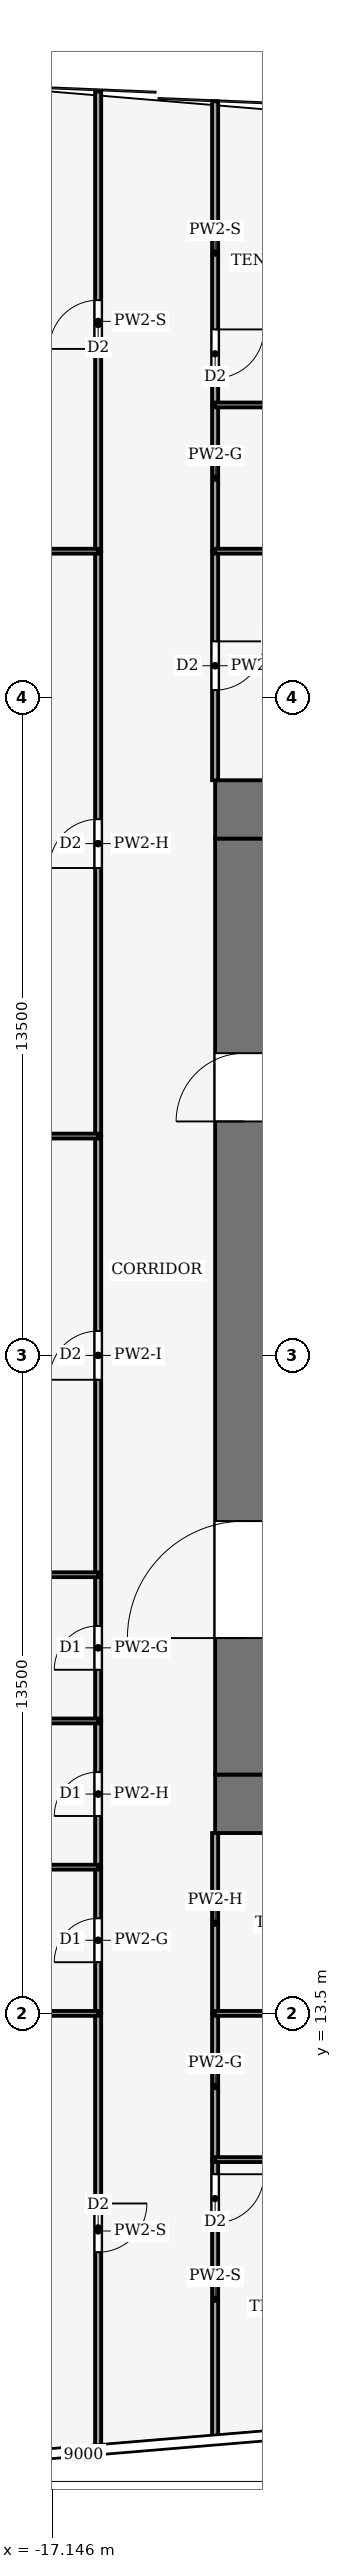
"""IFC4 building model, lengths in metres.
Left out: names, types, materials, properties, quantities, classifications, styles, units other than length and angle.
Written with IfcOpenShell. Run it as: python <this file> out.ifc"""

import sys

from ifc_helpers import new_model, si_unit, direction, frame, frame_2d, origin, place, context, subcontext, project, spatial, rectangle, extrude, element, fill, save


model = new_model("IFC4")
c1 = context("Model", 3, precision=1e-05, world=origin(), true_north=direction((0.0, 1.0)))
c2 = subcontext(c1, "Body", "Model", "MODEL_VIEW")
j1 = project(units=[si_unit("LENGTHUNIT", "METRE"), si_unit("PLANEANGLEUNIT", "RADIAN")], contexts=[c1])
p1 = place(None, origin())
s1 = spatial("IfcSite", under=j1, at=p1, CompositionType="ELEMENT")
p2 = place(p1, origin())
s2 = spatial("IfcBuilding", under=s1, at=p2, CompositionType="ELEMENT")
p3 = place(p2, frame((0.0, 0.0, 102.0)))
s3 = spatial("IfcBuildingStorey", under=s2, at=p3, CompositionType="ELEMENT", Elevation=102.0)
for number, where, z_axis, x_axis in (
    (1, (-13.8, 17.8, -0.13), (0.0, 0.0, 1.0), (1.0, 0.0, 0.0)),
    (2, (-13.8, 38.2, -0.13), (0.0, 0.0, 1.0), (1.0, 0.0, 0.0)),
):
    element("IfcWall", number, at=place(p3, frame(where, z_axis=z_axis, x_axis=x_axis)), inside=s3, PredefinedType="SHEAR", context=c2, shape_type="SweptSolid", body=[
        extrude(rectangle(XDim=27.6, YDim=1.2, at=frame_2d((13.8, 0.0))), origin(), (0.0, 0.0, 1.0), 4.0),
    ])
p4 = place(p3, frame((-13.2, 18.4, -0.13), z_axis=(0.0, 0.0, 1.0), x_axis=(0.0, 1.0, 0.0)))
e3 = element("IfcWall", 3, at=p4, inside=s3, PredefinedType="SHEAR", context=c2, shape_type="SweptSolid", body=[
    extrude(rectangle(XDim=19.2, YDim=1.2, at=frame_2d((9.6, 0.0))), origin(), (0.0, 0.0, 1.0), 4.0),
])
p5 = place(p4, frame((2.8, 0.0, 0.13)))
e4 = element("IfcOpeningElement", 4, at=p5, cuts=e3, PredefinedType="OPENING", context=c2, shape_type="SweptSolid", body=[
    extrude(rectangle(XDim=2.4, YDim=2.4, at=frame_2d((1.2, 1.2))), frame((0.0, 0.61, 0.0), z_axis=(0.0, -1.0, 0.0), x_axis=(1.0, 0.0, 0.0)), (0.0, 0.0, 1.0), 1.22),
])
p6 = place(p4, frame((13.4, 0.0, 0.13)))
e5 = element("IfcOpeningElement", 5, at=p6, cuts=e3, PredefinedType="OPENING", context=c2, shape_type="SweptSolid", body=[
    extrude(rectangle(XDim=1.4, YDim=2.2, at=frame_2d((0.7, 1.1))), frame((0.0, 0.61, 0.0), z_axis=(0.0, -1.0, 0.0), x_axis=(1.0, 0.0, 0.0)), (0.0, 0.0, 1.0), 1.22),
])
p7 = place(p3, frame((-16.2, 13.5, 0.0), z_axis=(0.0, 0.0, 1.0), x_axis=(0.0, -1.0, 0.0)))
e6 = element("IfcWall", 6, at=p7, inside=s3, PredefinedType="PARTITIONING", context=c2, shape_type="SweptSolid", body=[
    extrude(rectangle(XDim=8.93, YDim=0.125, at=frame_2d((4.465, 0.0))), origin(), (0.0, 0.0, 1.0), 3.04),
])
p8 = place(p7, frame((3.9, 0.0, 0.0)))
e7 = element("IfcOpeningElement", 7, at=p8, cuts=e6, PredefinedType="OPENING", context=c2, shape_type="SweptSolid", body=[
    extrude(rectangle(XDim=1.0, YDim=2.1, at=frame_2d((0.5, 1.05))), frame((0.0, 0.073, 0.0), z_axis=(0.0, -1.0, 0.0), x_axis=(1.0, 0.0, 0.0)), (0.0, 0.0, 1.0), 0.145),
])
p9 = place(p3, frame((-16.2, 13.5, 0.0), z_axis=(0.0, 0.0, 1.0), x_axis=(0.0, 1.0, 0.0)))
e8 = element("IfcWall", 8, at=p9, inside=s3, PredefinedType="PARTITIONING", context=c2, shape_type="SweptSolid", body=[
    extrude(rectangle(XDim=3.0, YDim=0.125, at=frame_2d((1.5, 0.0))), origin(), (0.0, 0.0, 1.0), 3.87),
])
p10 = place(p9, frame((1.05, 0.0, 0.0)))
e9 = element("IfcOpeningElement", 9, at=p10, cuts=e8, PredefinedType="OPENING", context=c2, shape_type="SweptSolid", body=[
    extrude(rectangle(XDim=0.9, YDim=2.1, at=frame_2d((0.45, 1.05))), frame((0.0, 0.073, 0.0), z_axis=(0.0, -1.0, 0.0), x_axis=(1.0, 0.0, 0.0)), (0.0, 0.0, 1.0), 0.145),
])
p11 = place(p3, frame((-16.2, 16.5, 0.0), z_axis=(0.0, 0.0, 1.0), x_axis=(0.0, 1.0, 0.0)))
e10 = element("IfcWall", 10, at=p11, inside=s3, PredefinedType="PARTITIONING", context=c2, shape_type="SweptSolid", body=[
    extrude(rectangle(XDim=3.0, YDim=0.125, at=frame_2d((1.5, 0.0))), origin(), (0.0, 0.0, 1.0), 3.14),
])
p12 = place(p11, frame((1.05, 0.0, 0.0)))
e11 = element("IfcOpeningElement", 11, at=p12, cuts=e10, PredefinedType="OPENING", context=c2, shape_type="SweptSolid", body=[
    extrude(rectangle(XDim=0.9, YDim=2.1, at=frame_2d((0.45, 1.05))), frame((0.0, 0.073, 0.0), z_axis=(0.0, -1.0, 0.0), x_axis=(1.0, 0.0, 0.0)), (0.0, 0.0, 1.0), 0.145),
])
p13 = place(p3, frame((-16.2, 19.5, 0.0), z_axis=(0.0, 0.0, 1.0), x_axis=(0.0, 1.0, 0.0)))
e12 = element("IfcWall", 12, at=p13, inside=s3, PredefinedType="PARTITIONING", context=c2, shape_type="SweptSolid", body=[
    extrude(rectangle(XDim=3.0, YDim=0.125, at=frame_2d((1.5, 0.0))), origin(), (0.0, 0.0, 1.0), 3.87),
])
p14 = place(p13, frame((1.05, 0.0, 0.0)))
e13 = element("IfcOpeningElement", 13, at=p14, cuts=e12, PredefinedType="OPENING", context=c2, shape_type="SweptSolid", body=[
    extrude(rectangle(XDim=0.9, YDim=2.1, at=frame_2d((0.45, 1.05))), frame((0.0, 0.073, 0.0), z_axis=(0.0, -1.0, 0.0), x_axis=(1.0, 0.0, 0.0)), (0.0, 0.0, 1.0), 0.145),
])
p15 = place(p3, frame((-16.2, 22.5, 0.0), z_axis=(0.0, 0.0, 1.0), x_axis=(0.0, 1.0, 0.0)))
e14 = element("IfcWall", 14, at=p15, inside=s3, PredefinedType="PARTITIONING", context=c2, shape_type="SweptSolid", body=[
    extrude(rectangle(XDim=9.0, YDim=0.125, at=frame_2d((4.5, 0.0))), origin(), (0.0, 0.0, 1.0), 3.48),
])
p16 = place(p15, frame((4.0, 0.0, 0.0)))
e15 = element("IfcOpeningElement", 15, at=p16, cuts=e14, PredefinedType="OPENING", context=c2, shape_type="SweptSolid", body=[
    extrude(rectangle(XDim=1.0, YDim=2.1, at=frame_2d((0.5, 1.05))), frame((0.0, 0.073, 0.0), z_axis=(0.0, -1.0, 0.0), x_axis=(1.0, 0.0, 0.0)), (0.0, 0.0, 1.0), 0.145),
])
p17 = place(p3, frame((-16.2, 31.5, 0.0), z_axis=(0.0, 0.0, 1.0), x_axis=(0.0, 1.0, 0.0)))
e16 = element("IfcWall", 16, at=p17, inside=s3, PredefinedType="PARTITIONING", context=c2, shape_type="SweptSolid", body=[
    extrude(rectangle(XDim=12.0, YDim=0.125, at=frame_2d((6.0, 0.0))), origin(), (0.0, 0.0, 1.0), 3.14),
])
p18 = place(p17, frame((5.5, 0.0, 0.0)))
e17 = element("IfcOpeningElement", 17, at=p18, cuts=e16, PredefinedType="OPENING", context=c2, shape_type="SweptSolid", body=[
    extrude(rectangle(XDim=1.0, YDim=2.1, at=frame_2d((0.5, 1.05))), frame((0.0, 0.073, 0.0), z_axis=(0.0, -1.0, 0.0), x_axis=(1.0, 0.0, 0.0)), (0.0, 0.0, 1.0), 0.145),
])
p19 = place(p3, frame((-16.2, 43.5, 0.0), z_axis=(0.0, 0.0, 1.0), x_axis=(0.0, 1.0, 0.0)))
e18 = element("IfcWall", 18, at=p19, inside=s3, PredefinedType="PARTITIONING", context=c2, shape_type="SweptSolid", body=[
    extrude(rectangle(XDim=9.43, YDim=0.125, at=frame_2d((4.715, 0.0))), origin(), (0.0, 0.0, 1.0), 3.04),
])
p20 = place(p19, frame((4.15, 0.0, 0.0)))
e19 = element("IfcOpeningElement", 19, at=p20, cuts=e18, PredefinedType="OPENING", context=c2, shape_type="SweptSolid", body=[
    extrude(rectangle(XDim=1.0, YDim=2.1, at=frame_2d((0.5, 1.05))), frame((0.0, 0.073, 0.0), z_axis=(0.0, -1.0, 0.0), x_axis=(1.0, 0.0, 0.0)), (0.0, 0.0, 1.0), 0.145),
])
p21 = place(p3, frame((-13.8, 10.5, 0.0), z_axis=(0.0, 0.0, 1.0), x_axis=(0.0, -1.0, 0.0)))
e20 = element("IfcWall", 20, at=p21, inside=s3, PredefinedType="PARTITIONING", context=c2, shape_type="SweptSolid", body=[
    extrude(rectangle(XDim=5.73, YDim=0.125, at=frame_2d((2.865, 0.0))), origin(), (0.0, 0.0, 1.0), 3.04),
])
p22 = place(p21, frame((0.3, 0.0, 0.0)))
e21 = element("IfcOpeningElement", 21, at=p22, cuts=e20, PredefinedType="OPENING", context=c2, shape_type="SweptSolid", body=[
    extrude(rectangle(XDim=1.0, YDim=2.1, at=frame_2d((0.5, 1.05))), frame((0.0, 0.073, 0.0), z_axis=(0.0, -1.0, 0.0), x_axis=(1.0, 0.0, 0.0)), (0.0, 0.0, 1.0), 0.145),
])
p23 = place(p3, frame((-13.8, 10.5, 0.0), z_axis=(0.0, 0.0, 1.0), x_axis=(0.0, 1.0, 0.0)))
e22 = element("IfcWall", 22, at=p23, inside=s3, PredefinedType="PARTITIONING", context=c2, shape_type="SweptSolid", body=[
    extrude(rectangle(XDim=3.0, YDim=0.125, at=frame_2d((1.5, 0.0))), origin(), (0.0, 0.0, 1.0), 3.87),
])
p24 = place(p3, frame((-13.8, 13.5, 0.0), z_axis=(0.0, 0.0, 1.0), x_axis=(0.0, 1.0, 0.0)))
e23 = element("IfcWall", 23, at=p24, inside=s3, PredefinedType="PARTITIONING", context=c2, shape_type="SweptSolid", body=[
    extrude(rectangle(XDim=3.7, YDim=0.125, at=frame_2d((1.85, 0.0))), origin(), (0.0, 0.0, 1.0), 3.14),
])
p25 = place(p3, frame((-13.8, 43.5, 0.0), z_axis=(0.0, 0.0, 1.0), x_axis=(0.0, -1.0, 0.0)))
e24 = element("IfcWall", 24, at=p25, inside=s3, PredefinedType="PARTITIONING", context=c2, shape_type="SweptSolid", body=[
    extrude(rectangle(XDim=4.7, YDim=0.125, at=frame_2d((2.35, 0.0))), origin(), (0.0, 0.0, 1.0), 3.14),
])
p26 = place(p25, frame((1.85, 0.0, 0.0)))
e25 = element("IfcOpeningElement", 25, at=p26, cuts=e24, PredefinedType="OPENING", context=c2, shape_type="SweptSolid", body=[
    extrude(rectangle(XDim=1.0, YDim=2.1, at=frame_2d((0.5, 1.05))), frame((0.0, 0.073, 0.0), z_axis=(0.0, -1.0, 0.0), x_axis=(1.0, 0.0, 0.0)), (0.0, 0.0, 1.0), 0.145),
])
p27 = place(p3, frame((-13.8, 43.5, 0.0), z_axis=(0.0, 0.0, 1.0), x_axis=(0.0, 1.0, 0.0)))
e26 = element("IfcWall", 26, at=p27, inside=s3, PredefinedType="PARTITIONING", context=c2, shape_type="SweptSolid", body=[
    extrude(rectangle(XDim=3.0, YDim=0.125, at=frame_2d((1.5, 0.0))), origin(), (0.0, 0.0, 1.0), 3.87),
])
p28 = place(p3, frame((-13.8, 52.73, 0.0), z_axis=(0.0, 0.0, 1.0), x_axis=(0.0, -1.0, 0.0)))
e27 = element("IfcWall", 27, at=p28, inside=s3, PredefinedType="PARTITIONING", context=c2, shape_type="SweptSolid", body=[
    extrude(rectangle(XDim=6.23, YDim=0.125, at=frame_2d((3.115, 0.0))), origin(), (0.0, 0.0, 1.0), 3.04),
])
p29 = place(p28, frame((4.68, 0.0, 0.0)))
e28 = element("IfcOpeningElement", 28, at=p29, cuts=e27, PredefinedType="OPENING", context=c2, shape_type="SweptSolid", body=[
    extrude(rectangle(XDim=1.0, YDim=2.1, at=frame_2d((0.5, 1.05))), frame((0.0, 0.073, 0.0), z_axis=(0.0, -1.0, 0.0), x_axis=(1.0, 0.0, 0.0)), (0.0, 0.0, 1.0), 0.145),
])
p30 = place(p3, frame((-16.2, 13.5, 0.0), z_axis=(0.0, 0.0, 1.0), x_axis=(-1.0, 0.0, 0.0)))
e29 = element("IfcWall", 29, at=p30, inside=s3, PredefinedType="PARTITIONING", context=c2, shape_type="SweptSolid", body=[
    extrude(rectangle(XDim=7.634, YDim=0.1, at=frame_2d((3.817, 0.0))), origin(), (0.0, 0.0, 1.0), 3.04),
])
p31 = place(p3, frame((-16.2, 16.5, 0.0), z_axis=(0.0, 0.0, 1.0), x_axis=(-1.0, 0.0, 0.0)))
e30 = element("IfcWall", 30, at=p31, inside=s3, PredefinedType="PARTITIONING", context=c2, shape_type="SweptSolid", body=[
    extrude(rectangle(XDim=7.387, YDim=0.1, at=frame_2d((3.693, 0.0))), origin(), (0.0, 0.0, 1.0), 3.04),
])
p32 = place(p3, frame((-16.2, 19.5, 0.0), z_axis=(0.0, 0.0, 1.0), x_axis=(-1.0, 0.0, 0.0)))
e31 = element("IfcWall", 31, at=p32, inside=s3, PredefinedType="PARTITIONING", context=c2, shape_type="SweptSolid", body=[
    extrude(rectangle(XDim=7.14, YDim=0.1, at=frame_2d((3.57, 0.0))), origin(), (0.0, 0.0, 1.0), 3.04),
])
p33 = place(p3, frame((-16.2, 22.5, 0.0), z_axis=(0.0, 0.0, 1.0), x_axis=(-1.0, 0.0, 0.0)))
e32 = element("IfcWall", 32, at=p33, inside=s3, PredefinedType="PARTITIONING", context=c2, shape_type="SweptSolid", body=[
    extrude(rectangle(XDim=6.894, YDim=0.1, at=frame_2d((3.447, 0.0))), origin(), (0.0, 0.0, 1.0), 3.04),
])
p34 = place(p3, frame((-16.2, 31.5, 0.0), z_axis=(0.0, 0.0, 1.0), x_axis=(-1.0, 0.0, 0.0)))
e33 = element("IfcWall", 33, at=p34, inside=s3, PredefinedType="PARTITIONING", context=c2, shape_type="SweptSolid", body=[
    extrude(rectangle(XDim=6.606, YDim=0.1, at=frame_2d((3.303, 0.0))), origin(), (0.0, 0.0, 1.0), 3.04),
])
p35 = place(p3, frame((-16.2, 43.5, 0.0), z_axis=(0.0, 0.0, 1.0), x_axis=(-1.0, 0.0, 0.0)))
e34 = element("IfcWall", 34, at=p35, inside=s3, PredefinedType="PARTITIONING", context=c2, shape_type="SweptSolid", body=[
    extrude(rectangle(XDim=7.592, YDim=0.1, at=frame_2d((3.796, 0.0))), origin(), (0.0, 0.0, 1.0), 3.04),
])
p36 = place(p3, frame((-13.8, 10.5, 0.0), z_axis=(0.0, 0.0, 1.0), x_axis=(1.0, 0.0, 0.0)))
e35 = element("IfcWall", 35, at=p36, inside=s3, PredefinedType="PARTITIONING", context=c2, shape_type="SweptSolid", body=[
    extrude(rectangle(XDim=6.3, YDim=0.1, at=frame_2d((3.15, 0.0))), origin(), (0.0, 0.0, 1.0), 3.39),
])
p37 = place(p36, frame((2.65, 0.0, 0.0)))
e36 = element("IfcOpeningElement", 36, at=p37, cuts=e35, PredefinedType="OPENING", context=c2, shape_type="SweptSolid", body=[
    extrude(rectangle(XDim=1.0, YDim=2.1, at=frame_2d((0.5, 1.05))), frame((0.0, 0.06, 0.0), z_axis=(0.0, -1.0, 0.0), x_axis=(1.0, 0.0, 0.0)), (0.0, 0.0, 1.0), 0.12),
])
p38 = place(p3, frame((-13.8, 13.5, 0.0), z_axis=(0.0, 0.0, 1.0), x_axis=(1.0, 0.0, 0.0)))
e37 = element("IfcWall", 37, at=p38, inside=s3, PredefinedType="PARTITIONING", context=c2, shape_type="SweptSolid", body=[
    extrude(rectangle(XDim=6.3, YDim=0.1, at=frame_2d((3.15, 0.0))), origin(), (0.0, 0.0, 1.0), 3.39),
])
p39 = place(p38, frame((2.65, 0.0, 0.0)))
e38 = element("IfcOpeningElement", 38, at=p39, cuts=e37, PredefinedType="OPENING", context=c2, shape_type="SweptSolid", body=[
    extrude(rectangle(XDim=1.0, YDim=2.1, at=frame_2d((0.5, 1.05))), frame((0.0, 0.06, 0.0), z_axis=(0.0, -1.0, 0.0), x_axis=(1.0, 0.0, 0.0)), (0.0, 0.0, 1.0), 0.12),
])
p40 = place(p3, frame((-13.8, 43.5, 0.0), z_axis=(0.0, 0.0, 1.0), x_axis=(1.0, 0.0, 0.0)))
e39 = element("IfcWall", 39, at=p40, inside=s3, PredefinedType="PARTITIONING", context=c2, shape_type="SweptSolid", body=[
    extrude(rectangle(XDim=6.3, YDim=0.1, at=frame_2d((3.15, 0.0))), origin(), (0.0, 0.0, 1.0), 3.39),
])
p41 = place(p40, frame((2.65, 0.0, 0.0)))
e40 = element("IfcOpeningElement", 40, at=p41, cuts=e39, PredefinedType="OPENING", context=c2, shape_type="SweptSolid", body=[
    extrude(rectangle(XDim=1.0, YDim=2.1, at=frame_2d((0.5, 1.05))), frame((0.0, 0.06, 0.0), z_axis=(0.0, -1.0, 0.0), x_axis=(1.0, 0.0, 0.0)), (0.0, 0.0, 1.0), 0.12),
])
p42 = place(p3, frame((-7.5, 46.5, 0.0), z_axis=(0.0, 0.0, 1.0), x_axis=(-1.0, 0.0, 0.0)))
e41 = element("IfcWall", 41, at=p42, inside=s3, PredefinedType="PARTITIONING", context=c2, shape_type="SweptSolid", body=[
    extrude(rectangle(XDim=6.3, YDim=0.1, at=frame_2d((3.15, 0.0))), origin(), (0.0, 0.0, 1.0), 3.39),
])
p43 = place(p5, origin())
e42 = element("IfcDoor", 42, at=p43, inside=s3, OperationType="DOUBLE_DOOR_SINGLE_SWING", PredefinedType="DOOR", context=c2, shape_type="SweptSolid", body=[
    extrude(rectangle(XDim=2.4, YDim=2.4, at=frame_2d((1.2, 1.2))), frame((0.0, 0.025, 0.0), z_axis=(0.0, -1.0, 0.0), x_axis=(1.0, 0.0, 0.0)), (0.0, 0.0, 1.0), 0.05),
])
fill(e4, e42)
p44 = place(p6, origin())
e43 = element("IfcDoor", 43, at=p44, inside=s3, OperationType="SINGLE_SWING_RIGHT", PredefinedType="DOOR", context=c2, shape_type="SweptSolid", body=[
    extrude(rectangle(XDim=1.4, YDim=2.2, at=frame_2d((0.7, 1.1))), frame((0.0, 0.025, 0.0), z_axis=(0.0, -1.0, 0.0), x_axis=(1.0, 0.0, 0.0)), (0.0, 0.0, 1.0), 0.05),
])
fill(e5, e43)
p45 = place(p8, origin())
e44 = element("IfcDoor", 44, at=p45, inside=s3, OperationType="SINGLE_SWING_LEFT", PredefinedType="DOOR", context=c2, shape_type="SweptSolid", body=[
    extrude(rectangle(XDim=1.0, YDim=2.1, at=frame_2d((0.5, 1.05))), frame((0.0, 0.025, 0.0), z_axis=(0.0, -1.0, 0.0), x_axis=(1.0, 0.0, 0.0)), (0.0, 0.0, 1.0), 0.05),
])
fill(e7, e44)
p46 = place(p10, origin())
e45 = element("IfcDoor", 45, at=p46, inside=s3, OperationType="SINGLE_SWING_RIGHT", PredefinedType="DOOR", context=c2, shape_type="SweptSolid", body=[
    extrude(rectangle(XDim=0.9, YDim=2.1, at=frame_2d((0.45, 1.05))), frame((0.0, 0.025, 0.0), z_axis=(0.0, -1.0, 0.0), x_axis=(1.0, 0.0, 0.0)), (0.0, 0.0, 1.0), 0.05),
])
fill(e9, e45)
p47 = place(p12, origin())
e46 = element("IfcDoor", 46, at=p47, inside=s3, OperationType="SINGLE_SWING_LEFT", PredefinedType="DOOR", context=c2, shape_type="SweptSolid", body=[
    extrude(rectangle(XDim=0.9, YDim=2.1, at=frame_2d((0.45, 1.05))), frame((0.0, 0.025, 0.0), z_axis=(0.0, -1.0, 0.0), x_axis=(1.0, 0.0, 0.0)), (0.0, 0.0, 1.0), 0.05),
])
fill(e11, e46)
p48 = place(p14, origin())
e47 = element("IfcDoor", 47, at=p48, inside=s3, OperationType="SINGLE_SWING_RIGHT", PredefinedType="DOOR", context=c2, shape_type="SweptSolid", body=[
    extrude(rectangle(XDim=0.9, YDim=2.1, at=frame_2d((0.45, 1.05))), frame((0.0, 0.025, 0.0), z_axis=(0.0, -1.0, 0.0), x_axis=(1.0, 0.0, 0.0)), (0.0, 0.0, 1.0), 0.05),
])
fill(e13, e47)
p49 = place(p16, origin())
e48 = element("IfcDoor", 48, at=p49, inside=s3, OperationType="SINGLE_SWING_LEFT", PredefinedType="DOOR", context=c2, shape_type="SweptSolid", body=[
    extrude(rectangle(XDim=1.0, YDim=2.1, at=frame_2d((0.5, 1.05))), frame((0.0, 0.025, 0.0), z_axis=(0.0, -1.0, 0.0), x_axis=(1.0, 0.0, 0.0)), (0.0, 0.0, 1.0), 0.05),
])
fill(e15, e48)
p50 = place(p18, origin())
e49 = element("IfcDoor", 49, at=p50, inside=s3, OperationType="SINGLE_SWING_RIGHT", PredefinedType="DOOR", context=c2, shape_type="SweptSolid", body=[
    extrude(rectangle(XDim=1.0, YDim=2.1, at=frame_2d((0.5, 1.05))), frame((0.0, 0.025, 0.0), z_axis=(0.0, -1.0, 0.0), x_axis=(1.0, 0.0, 0.0)), (0.0, 0.0, 1.0), 0.05),
])
fill(e17, e49)
p51 = place(p20, origin())
e50 = element("IfcDoor", 50, at=p51, inside=s3, OperationType="SINGLE_SWING_LEFT", PredefinedType="DOOR", context=c2, shape_type="SweptSolid", body=[
    extrude(rectangle(XDim=1.0, YDim=2.1, at=frame_2d((0.5, 1.05))), frame((0.0, 0.025, 0.0), z_axis=(0.0, -1.0, 0.0), x_axis=(1.0, 0.0, 0.0)), (0.0, 0.0, 1.0), 0.05),
])
fill(e19, e50)
p52 = place(p22, origin())
e51 = element("IfcDoor", 51, at=p52, inside=s3, OperationType="SINGLE_SWING_LEFT", PredefinedType="DOOR", context=c2, shape_type="SweptSolid", body=[
    extrude(rectangle(XDim=1.0, YDim=2.1, at=frame_2d((0.5, 1.05))), frame((0.0, 0.025, 0.0), z_axis=(0.0, -1.0, 0.0), x_axis=(1.0, 0.0, 0.0)), (0.0, 0.0, 1.0), 0.05),
])
fill(e21, e51)
p53 = place(p26, origin())
e52 = element("IfcDoor", 52, at=p53, inside=s3, OperationType="SINGLE_SWING_LEFT", PredefinedType="DOOR", context=c2, shape_type="SweptSolid", body=[
    extrude(rectangle(XDim=1.0, YDim=2.1, at=frame_2d((0.5, 1.05))), frame((0.0, 0.025, 0.0), z_axis=(0.0, -1.0, 0.0), x_axis=(1.0, 0.0, 0.0)), (0.0, 0.0, 1.0), 0.05),
])
fill(e25, e52)
p54 = place(p29, origin())
e53 = element("IfcDoor", 53, at=p54, inside=s3, OperationType="SINGLE_SWING_RIGHT", PredefinedType="DOOR", context=c2, shape_type="SweptSolid", body=[
    extrude(rectangle(XDim=1.0, YDim=2.1, at=frame_2d((0.5, 1.05))), frame((0.0, 0.025, 0.0), z_axis=(0.0, -1.0, 0.0), x_axis=(1.0, 0.0, 0.0)), (0.0, 0.0, 1.0), 0.05),
])
fill(e28, e53)
save(model, sys.argv[1])
